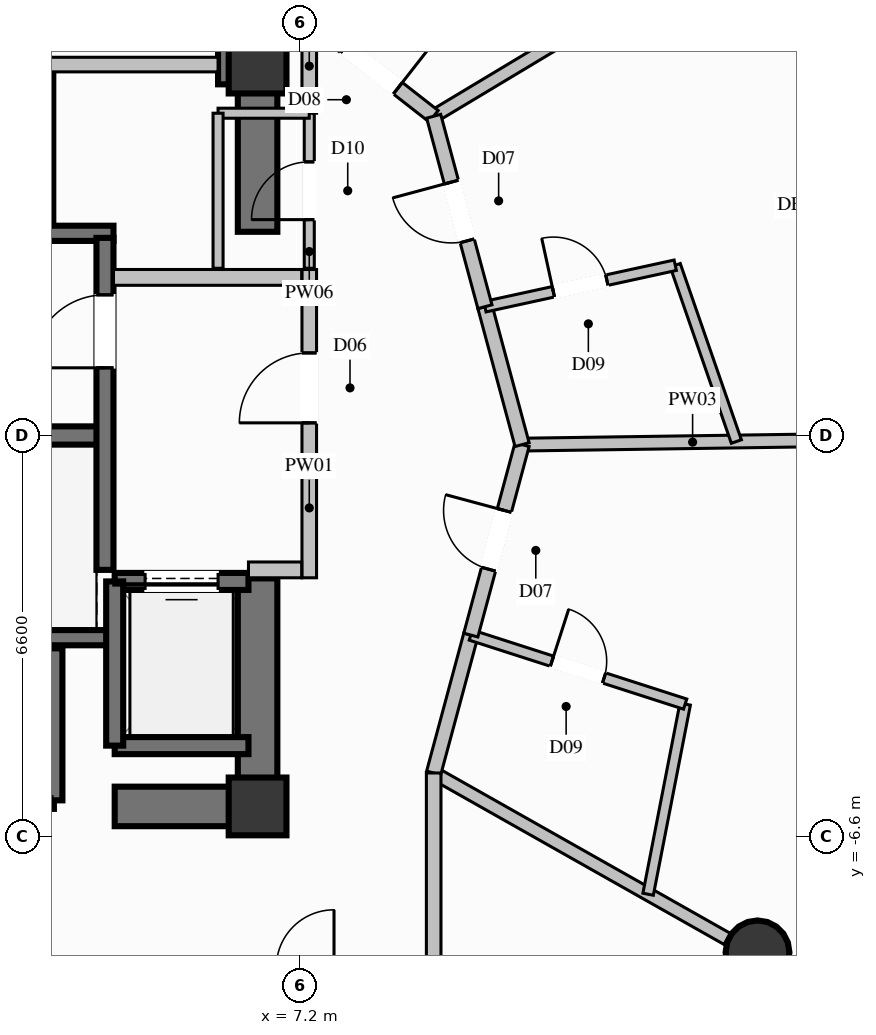
"""IFC4 building model, lengths in metres.
Left out: names, types, materials, properties, quantities, classifications, styles, units other than length and angle.
Written with IfcOpenShell. Run it as: python <this file> out.ifc"""

import sys

from ifc_helpers import new_model, si_unit, direction, frame, frame_2d, origin, origin_2d, place, context, subcontext, project, spatial, rectangle, circle, extrude, element, fill, save


model = new_model("IFC4")
c1 = context("Model", 3, precision=1e-05, world=origin(), true_north=direction((0.0, 1.0)))
c2 = subcontext(c1, "Body", "Model", "MODEL_VIEW")
j1 = project(units=[si_unit("LENGTHUNIT", "METRE"), si_unit("PLANEANGLEUNIT", "RADIAN")], contexts=[c1])
p1 = place(None, origin())
s1 = spatial("IfcSite", under=j1, at=p1, CompositionType="ELEMENT")
p2 = place(p1, origin())
s2 = spatial("IfcBuilding", under=s1, at=p2, CompositionType="ELEMENT")
p3 = place(p2, frame((0.0, 0.0, 120.6)))
s3 = spatial("IfcBuildingStorey", under=s2, at=p3, CompositionType="ELEMENT", Elevation=120.6)
for number, where, z_axis, x_axis in (
    (1, (6.5, -6.1, 0.0), (0.0, 0.0, 1.0), (1.0, 0.0, 0.0)),
    (2, (6.5, 6.1, 0.0), (0.0, 0.0, 1.0), (1.0, 0.0, 0.0)),
):
    element("IfcColumn", number, at=place(p3, frame(where, z_axis=z_axis, x_axis=x_axis)), inside=s3, PredefinedType="COLUMN", context=c2, shape_type="SweptSolid", body=[
        extrude(rectangle(XDim=0.95, YDim=0.95, at=origin_2d()), origin(), (0.0, 0.0, 1.0), 3.6),
    ])
p4 = place(p3, frame((-3.99, 0.0, 0.0), z_axis=(0.0, 0.0, 1.0), x_axis=(1.0, 0.0, 0.0)))
e3 = element("IfcWall", 3, at=p4, inside=s3, PredefinedType="SHEAR", context=c2, shape_type="SweptSolid", body=[
    extrude(rectangle(XDim=7.98, YDim=0.3, at=frame_2d((3.99, 0.0))), origin(), (0.0, 0.0, 1.0), 3.6),
])
for number, where, z_axis, x_axis in (
    (4, (-4.13, -3.325, 0.0), (0.0, 0.0, 1.0), (1.0, 0.0, 0.0)),
    (5, (-4.13, 3.325, 0.0), (0.0, 0.0, 1.0), (1.0, 0.0, 0.0)),
):
    element("IfcWall", number, at=place(p3, frame(where, z_axis=z_axis, x_axis=x_axis)), inside=s3, PredefinedType="SOLIDWALL", context=c2, shape_type="SweptSolid", body=[
        extrude(rectangle(XDim=8.26, YDim=0.25, at=frame_2d((4.13, 0.0))), origin(), (0.0, 0.0, 1.0), 3.6),
    ])
p5 = place(p3, frame((4.15, -6.1, 0.0), z_axis=(0.0, 0.0, 1.0), x_axis=(1.0, 0.0, 0.0)))
e6 = element("IfcWall", 6, at=p5, inside=s3, PredefinedType="SHEAR", context=c2, shape_type="SweptSolid", body=[
    extrude(rectangle(XDim=2.025, YDim=0.65, at=frame_2d((1.013, 0.0))), origin(), (0.0, 0.0, 1.0), 3.6),
])
p6 = place(p3, frame((5.85, 6.1, 0.0), z_axis=(0.0, 0.0, 1.0), x_axis=(1.0, 0.0, 0.0)))
e7 = element("IfcWall", 7, at=p6, inside=s3, PredefinedType="SHEAR", context=c2, shape_type="SweptSolid", body=[
    extrude(rectangle(XDim=0.325, YDim=0.65, at=frame_2d((0.163, 0.0))), origin(), (0.0, 0.0, 1.0), 3.6),
])
p7 = place(p3, frame((6.5, -6.425, 0.0), z_axis=(0.0, 0.0, 1.0), x_axis=(0.0, 1.0, 0.0)))
e8 = element("IfcWall", 8, at=p7, inside=s3, PredefinedType="SHEAR", context=c2, shape_type="SweptSolid", body=[
    extrude(rectangle(XDim=4.075, YDim=0.65, at=frame_2d((2.038, 0.0))), origin(), (0.0, 0.0, 1.0), 3.6),
])
p8 = place(p3, frame((6.5, 3.35, 0.0), z_axis=(0.0, 0.0, 1.0), x_axis=(0.0, 1.0, 0.0)))
e9 = element("IfcWall", 9, at=p8, inside=s3, PredefinedType="SHEAR", context=c2, shape_type="SweptSolid", body=[
    extrude(rectangle(XDim=3.075, YDim=0.65, at=frame_2d((1.538, 0.0))), origin(), (0.0, 0.0, 1.0), 3.6),
])
p9 = place(p3, frame((14.722, -8.5, 0.0), z_axis=(0.0, 0.0, 1.0), x_axis=(1.0, 0.0, 0.0)))
e10 = element("IfcColumn", 10, at=p9, inside=s3, PredefinedType="COLUMN", context=c2, shape_type="SweptSolid", body=[
    extrude(circle(Radius=0.525, at=origin_2d()), origin(), (0.0, 0.0, 1.0), 3.6),
])
p10 = place(p3, frame((1.05, -6.0, 0.0), z_axis=(0.0, 0.0, 1.0), x_axis=(1.0, 0.0, 0.0)))
e11 = element("IfcWall", 11, at=p10, inside=s3, PredefinedType="SOLIDWALL", context=c2, shape_type="SweptSolid", body=[
    extrude(rectangle(XDim=2.1, YDim=0.28, at=frame_2d((1.05, 0.0))), origin(), (0.0, 0.0, 1.0), 3.35),
])
p11 = place(p10, frame((0.5, 0.0, 0.0)))
e12 = element("IfcOpeningElement", 12, at=p11, cuts=e11, PredefinedType="OPENING", context=c2, shape_type="SweptSolid", body=[
    extrude(rectangle(XDim=1.1, YDim=2.2, at=frame_2d((0.55, 1.1))), frame((0.0, 0.15, 0.0), z_axis=(0.0, -1.0, 0.0), x_axis=(1.0, 0.0, 0.0)), (0.0, 0.0, 1.0), 0.3),
])
for number, where, z_axis, x_axis in (
    (13, (3.15, -6.0, 0.0), (0.0, 0.0, 1.0), (0.0, 1.0, 0.0)),
    (14, (3.0, 3.5, 0.0), (0.0, 0.0, 1.0), (0.0, 1.0, 0.0)),
):
    element("IfcWall", number, at=place(p3, frame(where, z_axis=z_axis, x_axis=x_axis)), inside=s3, PredefinedType="SOLIDWALL", context=c2, shape_type="SweptSolid", body=[
        extrude(rectangle(XDim=2.5, YDim=0.28, at=frame_2d((1.25, 0.0))), origin(), (0.0, 0.0, 1.0), 3.35),
    ])
p12 = place(p3, frame((4.15, -5.1, 0.0), z_axis=(0.0, 0.0, 1.0), x_axis=(1.0, 0.0, 0.0)))
e15 = element("IfcWall", 15, at=p12, inside=s3, PredefinedType="SOLIDWALL", context=c2, shape_type="SweptSolid", body=[
    extrude(rectangle(XDim=2.2, YDim=0.28, at=frame_2d((1.1, 0.0))), origin(), (0.0, 0.0, 1.0), 3.35),
])
p13 = place(p3, frame((6.35, -2.4, 0.0), z_axis=(0.0, 0.0, 1.0), x_axis=(-1.0, 0.0, 0.0)))
e16 = element("IfcWall", 16, at=p13, inside=s3, PredefinedType="SOLIDWALL", context=c2, shape_type="SweptSolid", body=[
    extrude(rectangle(XDim=2.2, YDim=0.28, at=frame_2d((1.1, 0.0))), origin(), (0.0, 0.0, 1.0), 3.35),
])
p14 = place(p13, frame((0.5, 0.0, 0.0)))
e17 = element("IfcOpeningElement", 17, at=p14, cuts=e16, PredefinedType="OPENING", context=c2, shape_type="SweptSolid", body=[
    extrude(rectangle(XDim=1.2, YDim=2.2, at=frame_2d((0.6, 1.1))), frame((0.0, 0.15, 0.0), z_axis=(0.0, -1.0, 0.0), x_axis=(1.0, 0.0, 0.0)), (0.0, 0.0, 1.0), 0.3),
])
p15 = place(p3, frame((4.15, -2.4, 0.0), z_axis=(0.0, 0.0, 1.0), x_axis=(0.0, -1.0, 0.0)))
e18 = element("IfcWall", 18, at=p15, inside=s3, PredefinedType="SOLIDWALL", context=c2, shape_type="SweptSolid", body=[
    extrude(rectangle(XDim=2.7, YDim=0.28, at=frame_2d((1.35, 0.0))), origin(), (0.0, 0.0, 1.0), 3.35),
])
p16 = place(p3, frame((3.99, -2.21, 0.0), z_axis=(0.0, 0.0, 1.0), x_axis=(0.0, 1.0, 0.0)))
e19 = element("IfcWall", 19, at=p16, inside=s3, PredefinedType="SOLIDWALL", context=c2, shape_type="SweptSolid", body=[
    extrude(rectangle(XDim=5.46, YDim=0.28, at=frame_2d((2.73, 0.0))), origin(), (0.0, 0.0, 1.0), 3.35),
])
p17 = place(p16, frame((3.323, 0.0, 0.0)))
e20 = element("IfcOpeningElement", 20, at=p17, cuts=e19, PredefinedType="OPENING", context=c2, shape_type="SweptSolid", body=[
    extrude(rectangle(XDim=1.2, YDim=2.2, at=frame_2d((0.6, 1.1))), frame((0.0, 0.15, 0.0), z_axis=(0.0, -1.0, 0.0), x_axis=(1.0, 0.0, 0.0)), (0.0, 0.0, 1.0), 0.3),
])
p18 = place(p3, frame((7.35, -2.34, 0.0), z_axis=(0.0, 0.0, 1.0), x_axis=(0.0, 1.0, 0.0)))
e21 = element("IfcWall", 21, at=p18, inside=s3, PredefinedType="PARTITIONING", context=c2, shape_type="SweptSolid", body=[
    extrude(rectangle(XDim=5.07, YDim=0.24, at=frame_2d((2.535, 0.0))), origin(), (0.0, 0.0, 1.0), 2.435),
])
p19 = place(p18, frame((2.548, 0.0, 0.0)))
e22 = element("IfcOpeningElement", 22, at=p19, cuts=e21, PredefinedType="OPENING", context=c2, shape_type="SweptSolid", body=[
    extrude(rectangle(XDim=1.15, YDim=2.2, at=frame_2d((0.575, 1.1))), frame((0.0, 0.13, 0.0), z_axis=(0.0, -1.0, 0.0), x_axis=(1.0, 0.0, 0.0)), (0.0, 0.0, 1.0), 0.26),
])
p20 = place(p3, frame((6.35, -2.21, 0.0), z_axis=(0.0, 0.0, 1.0), x_axis=(1.0, 0.0, 0.0)))
e23 = element("IfcWall", 23, at=p20, inside=s3, PredefinedType="PARTITIONING", context=c2, shape_type="SweptSolid", body=[
    extrude(rectangle(XDim=0.875, YDim=0.26, at=frame_2d((0.438, 0.0))), origin(), (0.0, 0.0, 1.0), 3.35),
])
p21 = place(p3, frame((4.13, 2.6, 0.0), z_axis=(0.0, 0.0, 1.0), x_axis=(1.0, 0.0, 0.0)))
e24 = element("IfcWall", 24, at=p21, inside=s3, PredefinedType="PARTITIONING", context=c2, shape_type="SweptSolid", body=[
    extrude(rectangle(XDim=3.095, YDim=0.26, at=frame_2d((1.548, 0.0))), origin(), (0.0, 0.0, 1.0), 3.35),
])
p22 = place(p3, frame((7.35, 5.3, 0.0), z_axis=(0.0, 0.0, 1.0), x_axis=(0.0, 1.0, 0.0)))
e25 = element("IfcWall", 25, at=p22, inside=s3, PredefinedType="PARTITIONING", context=c2, shape_type="SweptSolid", body=[
    extrude(rectangle(XDim=1.55, YDim=0.24, at=frame_2d((0.775, 0.0))), origin(), (0.0, 0.0, 1.0), 2.435),
])
p23 = place(p3, frame((3.0, 6.1, 0.0), z_axis=(0.0, 0.0, 1.0), x_axis=(1.0, 0.0, 0.0)))
e26 = element("IfcWall", 26, at=p23, inside=s3, PredefinedType="PARTITIONING", context=c2, shape_type="SweptSolid", body=[
    extrude(rectangle(XDim=2.85, YDim=0.24, at=frame_2d((1.425, 0.0))), origin(), (0.0, 0.0, 1.0), 2.435),
])
p24 = place(p3, frame((7.35, 2.75, 0.0), z_axis=(0.0, 0.0, 1.0), x_axis=(0.0, 1.0, 0.0)))
e27 = element("IfcWall", 27, at=p24, inside=s3, PredefinedType="PARTITIONING", context=c2, shape_type="SweptSolid", body=[
    extrude(rectangle(XDim=2.55, YDim=0.165, at=frame_2d((1.275, 0.0))), origin(), (0.0, 0.0, 1.0), 3.35),
])
p25 = place(p24, frame((0.8, 0.0, 0.0)))
e28 = element("IfcOpeningElement", 28, at=p25, cuts=e27, PredefinedType="OPENING", context=c2, shape_type="SweptSolid", body=[
    extrude(rectangle(XDim=0.95, YDim=2.1, at=frame_2d((0.475, 1.05))), frame((0.0, 0.093, 0.0), z_axis=(0.0, -1.0, 0.0), x_axis=(1.0, 0.0, 0.0)), (0.0, 0.0, 1.0), 0.185),
])
p26 = place(p3, frame((7.35, 5.3, 0.0), z_axis=(0.0, 0.0, 1.0), x_axis=(-1.0, 0.0, 0.0)))
e29 = element("IfcWall", 29, at=p26, inside=s3, PredefinedType="PARTITIONING", context=c2, shape_type="SweptSolid", body=[
    extrude(rectangle(XDim=1.5, YDim=0.165, at=frame_2d((0.75, 0.0))), origin(), (0.0, 0.0, 1.0), 2.435),
])
p27 = place(p3, frame((5.85, 5.3, 0.0), z_axis=(0.0, 0.0, 1.0), x_axis=(0.0, -1.0, 0.0)))
e30 = element("IfcWall", 30, at=p27, inside=s3, PredefinedType="PARTITIONING", context=c2, shape_type="SweptSolid", body=[
    extrude(rectangle(XDim=2.55, YDim=0.165, at=frame_2d((1.275, 0.0))), origin(), (0.0, 0.0, 1.0), 2.435),
])
p28 = place(p3, frame((10.85, -0.15, 0.0), z_axis=(0.0, 0.0, 1.0), x_axis=(0.999896226814, 0.014406096068, 0.0)))
e31 = element("IfcWall", 31, at=p28, inside=s3, PredefinedType="PARTITIONING", context=c2, shape_type="SweptSolid", body=[
    extrude(rectangle(XDim=5.609, YDim=0.21, at=frame_2d((2.805, 0.0))), origin(), (0.0, 0.0, 1.0), 3.35),
])
p29 = place(p3, frame((9.396, 5.25, 0.0), z_axis=(0.0, 0.0, 1.0), x_axis=(0.857379456535, 0.514684823471, 0.0)))
e32 = element("IfcWall", 32, at=p29, inside=s3, PredefinedType="PARTITIONING", context=c2, shape_type="SweptSolid", body=[
    extrude(rectangle(XDim=5.697, YDim=0.21, at=frame_2d((2.848, 0.0))), origin(), (0.0, 0.0, 1.0), 2.719),
])
p30 = place(p3, frame((9.396, -5.55, 0.0), z_axis=(0.0, 0.0, 1.0), x_axis=(0.870557919432, -0.492065959922, 0.0)))
e33 = element("IfcWall", 33, at=p30, inside=s3, PredefinedType="PARTITIONING", context=c2, shape_type="SweptSolid", body=[
    extrude(rectangle(XDim=5.546, YDim=0.21, at=frame_2d((2.773, 0.0))), origin(), (0.0, 0.0, 1.0), 2.719),
])
p31 = place(p3, frame((7.35, 6.85, 0.0), z_axis=(0.0, 0.0, 1.0), x_axis=(0.7876993483, -0.6160598483, 0.0)))
e34 = element("IfcWall", 34, at=p31, inside=s3, PredefinedType="PARTITIONING", context=c2, shape_type="SweptSolid", body=[
    extrude(rectangle(XDim=2.597, YDim=0.24, at=frame_2d((1.299, 0.0))), origin(), (0.0, 0.0, 1.0), 3.35),
])
p32 = place(p31, frame((0.749, 0.0, 0.0)))
e35 = element("IfcOpeningElement", 35, at=p32, cuts=e34, PredefinedType="OPENING", context=c2, shape_type="SweptSolid", body=[
    extrude(rectangle(XDim=1.1, YDim=2.3, at=frame_2d((0.55, 1.15))), frame((0.0, 0.13, 0.0), z_axis=(0.0, -1.0, 0.0), x_axis=(1.0, 0.0, 0.0)), (0.0, 0.0, 1.0), 0.26),
])
p33 = place(p3, frame((9.396, -5.55, 0.0), z_axis=(0.0, 0.0, 1.0), x_axis=(0.260152382661, 0.965567572879, 0.0)))
e36 = element("IfcWall", 36, at=p33, inside=s3, PredefinedType="PARTITIONING", context=c2, shape_type="SweptSolid", body=[
    extrude(rectangle(XDim=2.349, YDim=0.24, at=frame_2d((1.174, 0.0))), origin(), (0.0, 0.0, 1.0), 3.35),
])
p34 = place(p3, frame((12.923, -7.544, 0.0), z_axis=(0.0, 0.0, 1.0), x_axis=(0.191132211705, 0.981564301332, 0.0)))
e37 = element("IfcWall", 37, at=p34, inside=s3, PredefinedType="PLUMBINGWALL", context=c2, shape_type="SweptSolid", body=[
    extrude(rectangle(XDim=3.186, YDim=0.175, at=frame_2d((1.593, 0.0))), origin(), (0.0, 0.0, 1.0), 3.35),
])
p35 = place(p3, frame((10.007, -3.282, 0.0), z_axis=(0.0, 0.0, 1.0), x_axis=(0.951870664492, -0.306499980553, 0.0)))
e38 = element("IfcWall", 38, at=p35, inside=s3, PredefinedType="PLUMBINGWALL", context=c2, shape_type="SweptSolid", body=[
    extrude(rectangle(XDim=3.703, YDim=0.175, at=frame_2d((1.852, 0.0))), origin(), (0.0, 0.0, 1.0), 3.35),
])
p36 = place(p35, frame((1.402, 0.0, 0.0)))
e39 = element("IfcOpeningElement", 39, at=p36, cuts=e38, PredefinedType="OPENING", context=c2, shape_type="SweptSolid", body=[
    extrude(rectangle(XDim=0.9, YDim=2.1, at=frame_2d((0.45, 1.05))), frame((0.0, 0.098, 0.0), z_axis=(0.0, -1.0, 0.0), x_axis=(1.0, 0.0, 0.0)), (0.0, 0.0, 1.0), 0.195),
])
p37 = place(p3, frame((10.007, -3.282, 0.0), z_axis=(0.0, 0.0, 1.0), x_axis=(0.259905989708, 0.965633924691, 0.0)))
e40 = element("IfcWall", 40, at=p37, inside=s3, PredefinedType="PARTITIONING", context=c2, shape_type="SweptSolid", body=[
    extrude(rectangle(XDim=3.244, YDim=0.24, at=frame_2d((1.622, 0.0))), origin(), (0.0, 0.0, 1.0), 3.35),
])
p38 = place(p37, frame((1.122, 0.0, 0.0)))
e41 = element("IfcOpeningElement", 41, at=p38, cuts=e40, PredefinedType="OPENING", context=c2, shape_type="SweptSolid", body=[
    extrude(rectangle(XDim=1.0, YDim=2.2, at=frame_2d((0.5, 1.1))), frame((0.0, 0.13, 0.0), z_axis=(0.0, -1.0, 0.0), x_axis=(1.0, 0.0, 0.0)), (0.0, 0.0, 1.0), 0.26),
])
p39 = place(p3, frame((10.85, -0.15, 0.0), z_axis=(0.0, 0.0, 1.0), x_axis=(-0.260178493416, 0.965560537493, 0.0)))
e42 = element("IfcWall", 42, at=p39, inside=s3, PredefinedType="PARTITIONING", context=c2, shape_type="SweptSolid", body=[
    extrude(rectangle(XDim=2.349, YDim=0.24, at=frame_2d((1.174, 0.0))), origin(), (0.0, 0.0, 1.0), 3.35),
])
p40 = place(p3, frame((14.374, -0.099, 0.0), z_axis=(0.0, 0.0, 1.0), x_axis=(-0.327566891518, 0.944827990473, 0.0)))
e43 = element("IfcWall", 43, at=p40, inside=s3, PredefinedType="PLUMBINGWALL", context=c2, shape_type="SweptSolid", body=[
    extrude(rectangle(XDim=3.068, YDim=0.175, at=frame_2d((1.534, 0.0))), origin(), (0.0, 0.0, 1.0), 3.35),
])
p41 = place(p3, frame((10.239, 2.118, 0.0), z_axis=(0.0, 0.0, 1.0), x_axis=(0.977064797309, 0.212942203095, 0.0)))
e44 = element("IfcWall", 44, at=p41, inside=s3, PredefinedType="PLUMBINGWALL", context=c2, shape_type="SweptSolid", body=[
    extrude(rectangle(XDim=3.203, YDim=0.175, at=frame_2d((1.602, 0.0))), origin(), (0.0, 0.0, 1.0), 3.35),
])
p42 = place(p41, frame((1.152, 0.0, 0.0)))
e45 = element("IfcOpeningElement", 45, at=p42, cuts=e44, PredefinedType="OPENING", context=c2, shape_type="SweptSolid", body=[
    extrude(rectangle(XDim=0.9, YDim=2.1, at=frame_2d((0.45, 1.05))), frame((0.0, 0.098, 0.0), z_axis=(0.0, -1.0, 0.0), x_axis=(1.0, 0.0, 0.0)), (0.0, 0.0, 1.0), 0.195),
])
p43 = place(p3, frame((10.239, 2.118, 0.0), z_axis=(0.0, 0.0, 1.0), x_axis=(-0.259905989708, 0.965633924691, 0.0)))
e46 = element("IfcWall", 46, at=p43, inside=s3, PredefinedType="PARTITIONING", context=c2, shape_type="SweptSolid", body=[
    extrude(rectangle(XDim=3.244, YDim=0.24, at=frame_2d((1.622, 0.0))), origin(), (0.0, 0.0, 1.0), 3.35),
])
p44 = place(p43, frame((1.122, 0.0, 0.0)))
e47 = element("IfcOpeningElement", 47, at=p44, cuts=e46, PredefinedType="OPENING", context=c2, shape_type="SweptSolid", body=[
    extrude(rectangle(XDim=1.0, YDim=2.2, at=frame_2d((0.5, 1.1))), frame((0.0, 0.13, 0.0), z_axis=(0.0, -1.0, 0.0), x_axis=(1.0, 0.0, 0.0)), (0.0, 0.0, 1.0), 0.26),
])
p45 = place(p3, frame((9.396, -8.75, 0.0), z_axis=(0.0, 0.0, 1.0), x_axis=(0.0, 1.0, 0.0)))
e48 = element("IfcWall", 48, at=p45, inside=s3, PredefinedType="PARTITIONING", context=c2, shape_type="SweptSolid", body=[
    extrude(rectangle(XDim=3.2, YDim=0.24, at=frame_2d((1.6, 0.0))), origin(), (0.0, 0.0, 1.0), 3.35),
])
p46 = place(p14, origin())
e49 = element("IfcDoor", 49, at=p46, inside=s3, OperationType="SLIDING_TO_LEFT", PredefinedType="DOOR", context=c2, shape_type="SweptSolid", body=[
    extrude(rectangle(XDim=1.2, YDim=2.2, at=frame_2d((0.6, 1.1))), frame((0.0, 0.025, 0.0), z_axis=(0.0, -1.0, 0.0), x_axis=(1.0, 0.0, 0.0)), (0.0, 0.0, 1.0), 0.05),
])
fill(e17, e49)
p47 = place(p17, origin())
e50 = element("IfcDoor", 50, at=p47, inside=s3, OperationType="SINGLE_SWING_LEFT", PredefinedType="DOOR", context=c2, shape_type="SweptSolid", body=[
    extrude(rectangle(XDim=1.2, YDim=2.2, at=frame_2d((0.6, 1.1))), frame((0.0, 0.025, 0.0), z_axis=(0.0, -1.0, 0.0), x_axis=(1.0, 0.0, 0.0)), (0.0, 0.0, 1.0), 0.05),
])
fill(e20, e50)
p48 = place(p19, origin())
e51 = element("IfcDoor", 51, at=p48, inside=s3, OperationType="SINGLE_SWING_LEFT", PredefinedType="DOOR", context=c2, shape_type="SweptSolid", body=[
    extrude(rectangle(XDim=1.15, YDim=2.2, at=frame_2d((0.575, 1.1))), frame((0.0, 0.025, 0.0), z_axis=(0.0, -1.0, 0.0), x_axis=(1.0, 0.0, 0.0)), (0.0, 0.0, 1.0), 0.05),
])
fill(e22, e51)
p49 = place(p25, origin())
e52 = element("IfcDoor", 52, at=p49, inside=s3, OperationType="SINGLE_SWING_LEFT", PredefinedType="DOOR", context=c2, shape_type="SweptSolid", body=[
    extrude(rectangle(XDim=0.95, YDim=2.1, at=frame_2d((0.475, 1.05))), frame((0.0, 0.025, 0.0), z_axis=(0.0, -1.0, 0.0), x_axis=(1.0, 0.0, 0.0)), (0.0, 0.0, 1.0), 0.05),
])
fill(e28, e52)
p50 = place(p32, origin())
e53 = element("IfcDoor", 53, at=p50, inside=s3, OperationType="SINGLE_SWING_RIGHT", PredefinedType="DOOR", context=c2, shape_type="SweptSolid", body=[
    extrude(rectangle(XDim=1.1, YDim=2.3, at=frame_2d((0.55, 1.15))), frame((0.0, 0.025, 0.0), z_axis=(0.0, -1.0, 0.0), x_axis=(1.0, 0.0, 0.0)), (0.0, 0.0, 1.0), 0.05),
])
fill(e35, e53)
p51 = place(p36, origin())
e54 = element("IfcDoor", 54, at=p51, inside=s3, OperationType="SINGLE_SWING_LEFT", PredefinedType="DOOR", context=c2, shape_type="SweptSolid", body=[
    extrude(rectangle(XDim=0.9, YDim=2.1, at=frame_2d((0.45, 1.05))), frame((0.0, 0.025, 0.0), z_axis=(0.0, -1.0, 0.0), x_axis=(1.0, 0.0, 0.0)), (0.0, 0.0, 1.0), 0.05),
])
fill(e39, e54)
p52 = place(p38, origin())
e55 = element("IfcDoor", 55, at=p52, inside=s3, OperationType="SINGLE_SWING_RIGHT", PredefinedType="DOOR", context=c2, shape_type="SweptSolid", body=[
    extrude(rectangle(XDim=1.0, YDim=2.2, at=frame_2d((0.5, 1.1))), frame((0.0, 0.025, 0.0), z_axis=(0.0, -1.0, 0.0), x_axis=(1.0, 0.0, 0.0)), (0.0, 0.0, 1.0), 0.05),
])
fill(e41, e55)
p53 = place(p42, origin())
e56 = element("IfcDoor", 56, at=p53, inside=s3, OperationType="SINGLE_SWING_LEFT", PredefinedType="DOOR", context=c2, shape_type="SweptSolid", body=[
    extrude(rectangle(XDim=0.9, YDim=2.1, at=frame_2d((0.45, 1.05))), frame((0.0, 0.025, 0.0), z_axis=(0.0, -1.0, 0.0), x_axis=(1.0, 0.0, 0.0)), (0.0, 0.0, 1.0), 0.05),
])
fill(e45, e56)
p54 = place(p44, origin())
e57 = element("IfcDoor", 57, at=p54, inside=s3, OperationType="SINGLE_SWING_RIGHT", PredefinedType="DOOR", context=c2, shape_type="SweptSolid", body=[
    extrude(rectangle(XDim=1.0, YDim=2.2, at=frame_2d((0.5, 1.1))), frame((0.0, 0.025, 0.0), z_axis=(0.0, -1.0, 0.0), x_axis=(1.0, 0.0, 0.0)), (0.0, 0.0, 1.0), 0.05),
])
fill(e47, e57)
save(model, sys.argv[1])
